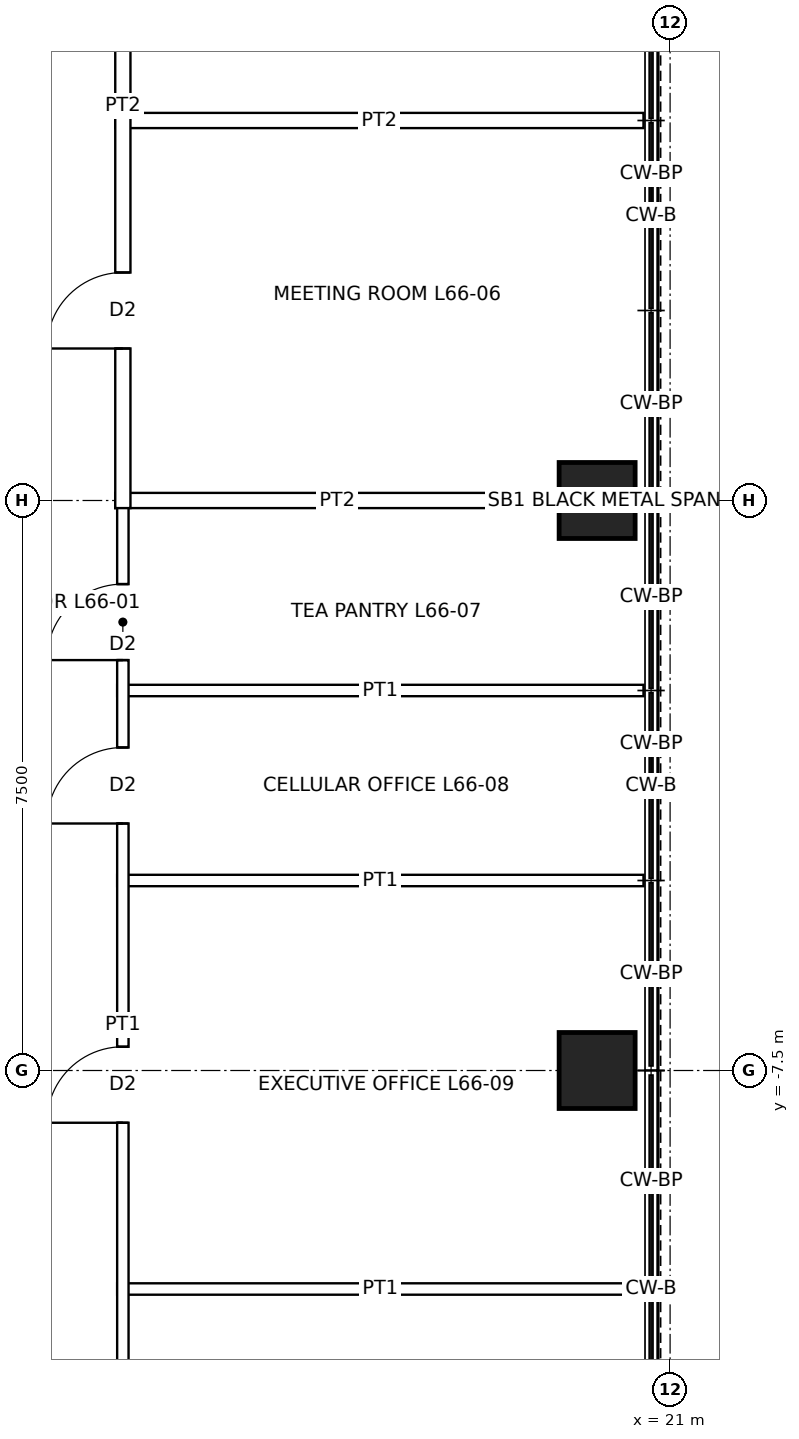
"""IFC4 building model, lengths in metres.
Left out: names, types, materials, properties, quantities, classifications, styles, units other than length and angle.
Written with IfcOpenShell. Run it as: python <this file> out.ifc"""

import sys

from ifc_helpers import new_model, si_unit, direction, frame, frame_2d, origin, origin_2d, place, context, subcontext, project, spatial, rectangle, hollow_rectangle, extrude, element, fill, save


model = new_model("IFC4")
c1 = context("Model", 3, precision=1e-05, world=origin(), true_north=direction((0.0, 1.0)))
c2 = subcontext(c1, "Body", "Model", "MODEL_VIEW")
j1 = project(units=[si_unit("LENGTHUNIT", "METRE"), si_unit("PLANEANGLEUNIT", "RADIAN")], contexts=[c1])
p1 = place(None, origin())
s1 = spatial("IfcSite", under=j1, at=p1, CompositionType="ELEMENT")
p2 = place(p1, origin())
s2 = spatial("IfcBuilding", under=s1, at=p2, CompositionType="ELEMENT")
p3 = place(p2, frame((0.0, 0.0, 299.9)))
s3 = spatial("IfcBuildingStorey", under=s2, at=p3, CompositionType="ELEMENT", Elevation=299.9)
for number, where, z_axis, x_axis in (
    (1, (20.04, 0.0, 0.0), (0.0, 0.0, 1.0), (1.0, 0.0, 0.0)),
    (2, (20.04, -7.5, 0.0), (0.0, 0.0, 1.0), (1.0, 0.0, 0.0)),
):
    element("IfcColumn", number, at=place(p3, frame(where, z_axis=z_axis, x_axis=x_axis)), inside=s3, PredefinedType="COLUMN", context=c2, shape_type="SweptSolid", body=[
        extrude(hollow_rectangle(XDim=1.0, YDim=1.0, WallThickness=0.075, at=origin_2d()), origin(), (0.0, 0.0, 1.0), 4.0),
    ])
for number, where, z_axis, x_axis in (
    (3, (13.725, -10.375, 0.0), (0.0, 0.0, 1.0), (1.0, 0.0, 0.0)),
    (4, (13.725, -5.0, 0.0), (0.0, 0.0, 1.0), (1.0, 0.0, 0.0)),
    (5, (13.725, -2.5, 0.0), (0.0, 0.0, 1.0), (1.0, 0.0, 0.0)),
):
    element("IfcWall", number, at=place(p3, frame(where, z_axis=z_axis, x_axis=x_axis)), inside=s3, PredefinedType="PARTITIONING", context=c2, shape_type="SweptSolid", body=[
        extrude(rectangle(XDim=6.925, YDim=0.15, at=frame_2d((3.462, 0.0))), origin(), (0.0, 0.0, 1.0), 3.85),
    ])
p4 = place(p3, frame((13.7, 0.0, 0.0), z_axis=(0.0, 0.0, 1.0), x_axis=(1.0, 0.0, 0.0)))
e6 = element("IfcWall", 6, at=p4, inside=s3, PredefinedType="PARTITIONING", context=c2, shape_type="SweptSolid", body=[
    extrude(rectangle(XDim=5.84, YDim=0.2, at=frame_2d((2.92, 0.0))), origin(), (0.0, 0.0, 1.0), 3.243),
])
p5 = place(p3, frame((13.7, 5.0, 0.0), z_axis=(0.0, 0.0, 1.0), x_axis=(1.0, 0.0, 0.0)))
e7 = element("IfcWall", 7, at=p5, inside=s3, PredefinedType="PARTITIONING", context=c2, shape_type="SweptSolid", body=[
    extrude(rectangle(XDim=6.95, YDim=0.2, at=frame_2d((3.475, 0.0))), origin(), (0.0, 0.0, 1.0), 3.85),
])
p6 = place(p3, frame((13.8, -13.875, 0.0), z_axis=(0.0, 0.0, 1.0), x_axis=(0.0, 1.0, 0.0)))
e8 = element("IfcWall", 8, at=p6, inside=s3, PredefinedType="PARTITIONING", context=c2, shape_type="SweptSolid", body=[
    extrude(rectangle(XDim=13.95, YDim=0.15, at=frame_2d((6.975, 0.0))), origin(), (0.0, 0.0, 1.0), 3.85),
])
p7 = place(p6, frame((11.775, 0.0, 0.0)))
e9 = element("IfcOpeningElement", 9, at=p7, cuts=e8, PredefinedType="OPENING", context=c2, shape_type="SweptSolid", body=[
    extrude(rectangle(XDim=1.0, YDim=2.1, at=frame_2d((0.5, 1.05))), frame((0.0, 0.085, 0.0), z_axis=(0.0, -1.0, 0.0), x_axis=(1.0, 0.0, 0.0)), (0.0, 0.0, 1.0), 0.17),
])
p8 = place(p6, frame((9.625, 0.0, 0.0)))
e10 = element("IfcOpeningElement", 10, at=p8, cuts=e8, PredefinedType="OPENING", context=c2, shape_type="SweptSolid", body=[
    extrude(rectangle(XDim=1.0, YDim=2.1, at=frame_2d((0.5, 1.05))), frame((0.0, 0.085, 0.0), z_axis=(0.0, -1.0, 0.0), x_axis=(1.0, 0.0, 0.0)), (0.0, 0.0, 1.0), 0.17),
])
p9 = place(p6, frame((5.688, 0.0, 0.0)))
e11 = element("IfcOpeningElement", 11, at=p9, cuts=e8, PredefinedType="OPENING", context=c2, shape_type="SweptSolid", body=[
    extrude(rectangle(XDim=1.0, YDim=2.1, at=frame_2d((0.5, 1.05))), frame((0.0, 0.085, 0.0), z_axis=(0.0, -1.0, 0.0), x_axis=(1.0, 0.0, 0.0)), (0.0, 0.0, 1.0), 0.17),
])
p10 = place(p3, frame((13.8, -0.1, 0.0), z_axis=(0.0, 0.0, 1.0), x_axis=(0.0, 1.0, 0.0)))
e12 = element("IfcWall", 12, at=p10, inside=s3, PredefinedType="PARTITIONING", context=c2, shape_type="SweptSolid", body=[
    extrude(rectangle(XDim=10.575, YDim=0.2, at=frame_2d((5.288, 0.0))), origin(), (0.0, 0.0, 1.0), 3.85),
])
p11 = place(p10, frame((7.288, 0.0, 0.0)))
e13 = element("IfcOpeningElement", 13, at=p11, cuts=e12, PredefinedType="OPENING", context=c2, shape_type="SweptSolid", body=[
    extrude(rectangle(XDim=1.0, YDim=2.1, at=frame_2d((0.5, 1.05))), frame((0.0, 0.11, 0.0), z_axis=(0.0, -1.0, 0.0), x_axis=(1.0, 0.0, 0.0)), (0.0, 0.0, 1.0), 0.22),
])
p12 = place(p10, frame((2.1, 0.0, 0.0)))
e14 = element("IfcOpeningElement", 14, at=p12, cuts=e12, PredefinedType="OPENING", context=c2, shape_type="SweptSolid", body=[
    extrude(rectangle(XDim=1.0, YDim=2.1, at=frame_2d((0.5, 1.05))), frame((0.0, 0.11, 0.0), z_axis=(0.0, -1.0, 0.0), x_axis=(1.0, 0.0, 0.0)), (0.0, 0.0, 1.0), 0.22),
])
p13 = place(p12, origin())
e15 = element("IfcDoor", 15, at=p13, inside=s3, OperationType="SINGLE_SWING_LEFT", PredefinedType="DOOR", context=c2, shape_type="SweptSolid", body=[
    extrude(rectangle(XDim=1.0, YDim=2.1, at=frame_2d((0.5, 1.05))), frame((0.0, 0.025, 0.0), z_axis=(0.0, -1.0, 0.0), x_axis=(1.0, 0.0, 0.0)), (0.0, 0.0, 1.0), 0.05),
])
fill(e14, e15)
p14 = place(p7, origin())
e16 = element("IfcDoor", 16, at=p14, inside=s3, OperationType="SINGLE_SWING_LEFT", PredefinedType="DOOR", context=c2, shape_type="SweptSolid", body=[
    extrude(rectangle(XDim=1.0, YDim=2.1, at=frame_2d((0.5, 1.05))), frame((0.0, 0.025, 0.0), z_axis=(0.0, -1.0, 0.0), x_axis=(1.0, 0.0, 0.0)), (0.0, 0.0, 1.0), 0.05),
])
fill(e9, e16)
p15 = place(p8, origin())
e17 = element("IfcDoor", 17, at=p15, inside=s3, OperationType="SINGLE_SWING_LEFT", PredefinedType="DOOR", context=c2, shape_type="SweptSolid", body=[
    extrude(rectangle(XDim=1.0, YDim=2.1, at=frame_2d((0.5, 1.05))), frame((0.0, 0.025, 0.0), z_axis=(0.0, -1.0, 0.0), x_axis=(1.0, 0.0, 0.0)), (0.0, 0.0, 1.0), 0.05),
])
fill(e10, e17)
p16 = place(p9, origin())
e18 = element("IfcDoor", 18, at=p16, inside=s3, OperationType="SINGLE_SWING_LEFT", PredefinedType="DOOR", context=c2, shape_type="SweptSolid", body=[
    extrude(rectangle(XDim=1.0, YDim=2.1, at=frame_2d((0.5, 1.05))), frame((0.0, 0.025, 0.0), z_axis=(0.0, -1.0, 0.0), x_axis=(1.0, 0.0, 0.0)), (0.0, 0.0, 1.0), 0.05),
])
fill(e11, e18)
save(model, sys.argv[1])
